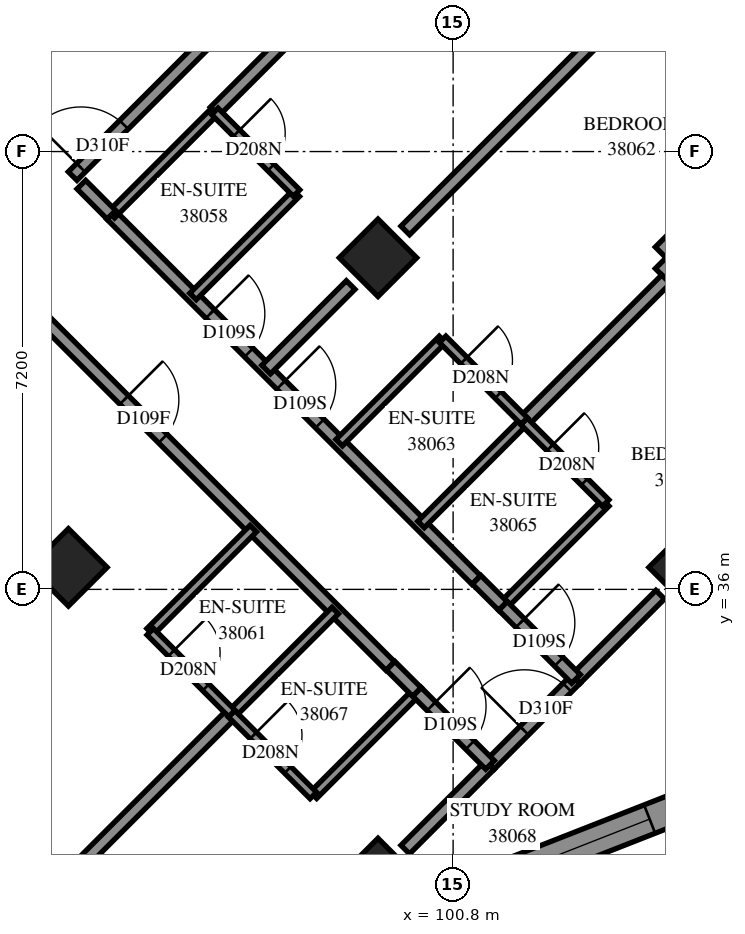
"""IFC4 building model, lengths in metres.
Left out: names, types, materials, properties, quantities, classifications, styles, units other than length and angle.
Written with IfcOpenShell. Run it as: python <this file> out.ifc"""

import sys

from ifc_helpers import new_model, si_unit, direction, frame, frame_2d, origin, origin_2d, place, context, subcontext, project, spatial, polyline, rectangle, outline, extrude, element, fill, save


model = new_model("IFC4")
c1 = context("Model", 3, precision=1e-05, world=origin(), true_north=direction((0.0, 1.0)))
c2 = subcontext(c1, "Body", "Model", "MODEL_VIEW")
j1 = project(units=[si_unit("LENGTHUNIT", "METRE"), si_unit("PLANEANGLEUNIT", "RADIAN")], contexts=[c1])
p1 = place(None, origin())
s1 = spatial("IfcSite", under=j1, at=p1, CompositionType="ELEMENT")
p2 = place(p1, origin())
s2 = spatial("IfcBuilding", under=s1, at=p2, CompositionType="ELEMENT")
p3 = place(p2, frame((0.0, 0.0, 142.2)))
s3 = spatial("IfcBuildingStorey", under=s2, at=p3, CompositionType="ELEMENT", Elevation=142.2)
for number, where, z_axis, x_axis in (
    (1, (99.565, 41.453, 0.0), (0.0, 0.0, 1.0), (0.707, -0.707, 0.0)),
    (2, (94.474, 36.362, 0.0), (0.0, 0.0, 1.0), (0.707, -0.707, 0.0)),
    (3, (104.656, 36.362, 0.0), (0.0, 0.0, 1.0), (0.707, -0.707, 0.0)),
    (4, (99.565, 31.271, 0.0), (0.0, 0.0, 1.0), (0.707, -0.707, 0.0)),
):
    element("IfcColumn", number, at=place(p3, frame(where, z_axis=z_axis, x_axis=x_axis)), inside=s3, PredefinedType="COLUMN", context=c2, shape_type="SweptSolid", body=[
        extrude(rectangle(XDim=0.9, YDim=0.9, at=origin_2d()), origin(), (0.0, 0.0, 1.0), 3.1),
    ])
p4 = place(p3, frame((87.049, 38.695, -0.3), z_axis=(0.0, 0.0, 1.0), x_axis=(0.7071067812, 0.7071067812, 0.0)))
e5 = element("IfcWall", 5, at=p4, inside=s3, PredefinedType="SHEAR", context=c2, shape_type="SweptSolid", body=[
    extrude(rectangle(XDim=14.4, YDim=0.6, at=frame_2d((7.2, 0.0))), origin(), (0.0, 0.0, 1.0), 2.7),
])
p5 = place(p4, frame((4.55, 0.0, 0.3)))
e6 = element("IfcOpeningElement", 6, at=p5, cuts=e5, PredefinedType="OPENING", context=c2, shape_type="SweptSolid", body=[
    extrude(rectangle(XDim=1.1, YDim=2.1, at=frame_2d((0.55, 1.05))), frame((0.0, 0.31, 0.0), z_axis=(0.0, -1.0, 0.0), x_axis=(1.0, 0.0, 0.0)), (0.0, 0.0, 1.0), 0.62),
])
p6 = place(p4, frame((11.35, 0.0, 0.3)))
e7 = element("IfcOpeningElement", 7, at=p6, cuts=e5, PredefinedType="OPENING", context=c2, shape_type="SweptSolid", body=[
    extrude(rectangle(XDim=1.1, YDim=2.1, at=frame_2d((0.55, 1.05))), frame((0.0, 0.31, 0.0), z_axis=(0.0, -1.0, 0.0), x_axis=(1.0, 0.0, 0.0)), (0.0, 0.0, 1.0), 0.62),
])
p7 = place(p3, frame((100.871, 30.982, 0.0), z_axis=(0.0, 0.0, 1.0), x_axis=(0.9309312258, 0.3651945412, 0.0)))
e8 = element("IfcWall", 8, at=p7, inside=s3, PredefinedType="SOLIDWALL", context=c2, shape_type="SweptSolid", body=[
    extrude(outline(polyline([(0.109, -0.25), (5.609, -0.25), (5.38, 0.25), (-0.109, 0.25), (0.109, -0.25)])), origin(), (0.0, 0.0, 1.0), 3.1),
])
p8 = place(p7, frame((0.596, 0.0, 0.45)))
e9 = element("IfcOpeningElement", 9, at=p8, cuts=e8, PredefinedType="OPENING", context=c2, shape_type="SweptSolid", body=[
    extrude(rectangle(XDim=2.8, YDim=2.5, at=frame_2d((1.4, 1.25))), frame((0.0, 0.26, 0.0), z_axis=(0.0, -1.0, 0.0), x_axis=(1.0, 0.0, 0.0)), (0.0, 0.0, 1.0), 0.52),
])
p9 = place(p3, frame((107.762, 37.994, 0.0), z_axis=(0.0, 0.0, 1.0), x_axis=(-0.7071170013, 0.7070965609, 0.0)))
e10 = element("IfcWall", 10, at=p9, inside=s3, PredefinedType="SOLIDWALL", context=c2, shape_type="SweptSolid", body=[
    extrude(outline(polyline([(-0.158, -0.25), (4.642, -0.25), (5.142, 0.25), (0.158, 0.25), (-0.158, -0.25)])), origin(), (0.0, 0.0, 1.0), 3.1),
])
p10 = place(p9, frame((1.967, 0.0, 0.6)))
e11 = element("IfcOpeningElement", 11, at=p10, cuts=e10, PredefinedType="OPENING", context=c2, shape_type="SweptSolid", body=[
    extrude(rectangle(XDim=1.8, YDim=1.9, at=frame_2d((0.9, 0.95))), frame((0.0, 0.26, 0.0), z_axis=(0.0, -1.0, 0.0), x_axis=(1.0, 0.0, 0.0)), (0.0, 0.0, 1.0), 0.52),
])
p11 = place(p3, frame((104.302, 41.453, 0.0), z_axis=(0.0, 0.0, 1.0), x_axis=(0.707115584, 0.7070979783, 0.0)))
e12 = element("IfcWall", 12, at=p11, inside=s3, PredefinedType="SOLIDWALL", context=c2, shape_type="SweptSolid", body=[
    extrude(outline(polyline([(0.25, -0.25), (6.011, -0.25), (5.349, 0.25), (-0.25, 0.25), (0.25, -0.25)])), origin(), (0.0, 0.0, 1.0), 3.1),
])
p12 = place(p11, frame((1.125, 0.0, 0.6)))
e13 = element("IfcOpeningElement", 13, at=p12, cuts=e12, PredefinedType="OPENING", context=c2, shape_type="SweptSolid", body=[
    extrude(rectangle(XDim=1.8, YDim=1.9, at=frame_2d((0.9, 0.95))), frame((0.0, 0.26, 0.0), z_axis=(0.0, -1.0, 0.0), x_axis=(1.0, 0.0, 0.0)), (0.0, 0.0, 1.0), 0.52),
])
p13 = place(p3, frame((93.127, 41.379, 0.0), z_axis=(0.0, 0.0, 1.0), x_axis=(0.7071067812, -0.7071067812, 0.0)))
e14 = element("IfcWall", 14, at=p13, inside=s3, PredefinedType="PARTITIONING", context=c2, shape_type="SweptSolid", body=[
    extrude(rectangle(XDim=9.39, YDim=0.2, at=frame_2d((4.695, 0.0))), origin(), (0.0, 0.0, 1.0), 3.1),
])
p14 = place(p13, frame((3.2, 0.0, 0.0)))
e15 = element("IfcOpeningElement", 15, at=p14, cuts=e14, PredefinedType="OPENING", context=c2, shape_type="SweptSolid", body=[
    extrude(rectangle(XDim=0.9, YDim=2.1, at=frame_2d((0.45, 1.05))), frame((0.0, 0.11, 0.0), z_axis=(0.0, -1.0, 0.0), x_axis=(1.0, 0.0, 0.0)), (0.0, 0.0, 1.0), 0.22),
])
p15 = place(p3, frame((94.543, 42.797, 0.0), z_axis=(0.0, 0.0, 1.0), x_axis=(0.7071067812, 0.7071067812, 0.0)))
e16 = element("IfcWall", 16, at=p15, inside=s3, PredefinedType="PARTITIONING", context=c2, shape_type="SweptSolid", body=[
    extrude(rectangle(XDim=8.901, YDim=0.2, at=frame_2d((4.45, 0.0))), origin(), (0.0, 0.0, 1.0), 3.1),
])
p16 = place(p15, frame((0.193, 0.0, 0.0)))
e17 = element("IfcOpeningElement", 17, at=p16, cuts=e16, PredefinedType="OPENING", context=c2, shape_type="SweptSolid", body=[
    extrude(rectangle(XDim=1.0, YDim=2.1, at=frame_2d((0.5, 1.05))), frame((0.0, 0.11, 0.0), z_axis=(0.0, -1.0, 0.0), x_axis=(1.0, 0.0, 0.0)), (0.0, 0.0, 1.0), 0.22),
])
p17 = place(p3, frame((95.177, 42.157, 0.0), z_axis=(0.0, 0.0, 1.0), x_axis=(0.7071067812, -0.7071067812, 0.0)))
e18 = element("IfcWall", 18, at=p17, inside=s3, PredefinedType="PARTITIONING", context=c2, shape_type="SweptSolid", body=[
    extrude(rectangle(XDim=8.491, YDim=0.2, at=frame_2d((4.245, 0.0))), origin(), (0.0, 0.0, 1.0), 3.1),
])
p18 = place(p17, frame((2.3, 0.0, 0.0)))
e19 = element("IfcOpeningElement", 19, at=p18, cuts=e18, PredefinedType="OPENING", context=c2, shape_type="SweptSolid", body=[
    extrude(rectangle(XDim=0.9, YDim=2.1, at=frame_2d((0.45, 1.05))), frame((0.0, 0.11, 0.0), z_axis=(0.0, -1.0, 0.0), x_axis=(1.0, 0.0, 0.0)), (0.0, 0.0, 1.0), 0.22),
])
p19 = place(p17, frame((3.95, 0.0, 0.0)))
e20 = element("IfcOpeningElement", 20, at=p19, cuts=e18, PredefinedType="OPENING", context=c2, shape_type="SweptSolid", body=[
    extrude(rectangle(XDim=0.9, YDim=2.1, at=frame_2d((0.45, 1.05))), frame((0.0, 0.11, 0.0), z_axis=(0.0, -1.0, 0.0), x_axis=(1.0, 0.0, 0.0)), (0.0, 0.0, 1.0), 0.22),
])
p20 = place(p3, frame((96.877, 43.859, 0.0), z_axis=(0.0, 0.0, 1.0), x_axis=(0.7071127272, 0.7071008351, 0.0)))
e21 = element("IfcWall", 21, at=p20, inside=s3, PredefinedType="PARTITIONING", context=c2, shape_type="SweptSolid", body=[
    extrude(rectangle(XDim=8.409, YDim=0.2, at=frame_2d((4.205, 0.0))), origin(), (0.0, 0.0, 1.0), 3.1),
])
p21 = place(p3, frame((91.387, 28.186, 0.0), z_axis=(0.0, 0.0, 1.0), x_axis=(0.7071067812, 0.7071067812, 0.0)))
e22 = element("IfcWall", 22, at=p21, inside=s3, PredefinedType="PARTITIONING", context=c2, shape_type="SweptSolid", body=[
    extrude(rectangle(XDim=8.164, YDim=0.2, at=frame_2d((4.082, 0.0))), origin(), (0.0, 0.0, 1.0), 3.1),
])
p22 = place(p3, frame((100.013, 41.903, 0.0), z_axis=(0.0, 0.0, 1.0), x_axis=(0.7071067812, 0.7071067812, 0.0)))
e23 = element("IfcWall", 23, at=p22, inside=s3, PredefinedType="PARTITIONING", context=c2, shape_type="SweptSolid", body=[
    extrude(rectangle(XDim=5.928, YDim=0.2, at=frame_2d((2.964, 0.0))), origin(), (0.0, 0.0, 1.0), 3.1),
])
p23 = place(p3, frame((101.968, 38.766, 0.0), z_axis=(0.0, 0.0, 1.0), x_axis=(0.7071067812, 0.7071067812, 0.0)))
e24 = element("IfcWall", 24, at=p23, inside=s3, PredefinedType="PARTITIONING", context=c2, shape_type="SweptSolid", body=[
    extrude(rectangle(XDim=3.3, YDim=0.2, at=frame_2d((1.65, 0.0))), origin(), (0.0, 0.0, 1.0), 3.1),
])
for number, where, z_axis, x_axis in (
    (25, (96.523, 40.817, 0.0), (0.0, 0.0, 1.0), (0.707, 0.707, 0.0)),
    (26, (98.927, 38.413, 0.0), (0.0, 0.0, 1.0), (0.707, 0.707, 0.0)),
    (27, (98.503, 32.615, 0.0), (0.0, 0.0, 1.0), (0.707, 0.707, 0.0)),
    (28, (95.179, 42.161, 0.0), (0.0, 0.0, 1.0), (0.707, 0.707, 0.0)),
):
    element("IfcWall", number, at=place(p3, frame(where, z_axis=z_axis, x_axis=x_axis)), inside=s3, PredefinedType="PARTITIONING", context=c2, shape_type="SweptSolid", body=[
        extrude(rectangle(XDim=2.401, YDim=0.15, at=frame_2d((1.201, 0.0))), origin(), (0.0, 0.0, 1.0), 3.1),
    ])
for number, where, z_axis, x_axis in (
    (29, (97.163, 33.955, 0.0), (0.0, 0.0, 1.0), (0.708, 0.707, 0.0)),
    (30, (100.273, 37.067, 0.0), (0.0, 0.0, 1.0), (0.707, 0.708, 0.0)),
):
    element("IfcWall", number, at=place(p3, frame(where, z_axis=z_axis, x_axis=x_axis)), inside=s3, PredefinedType="PARTITIONING", context=c2, shape_type="SweptSolid", body=[
        extrude(rectangle(XDim=2.4, YDim=0.15, at=frame_2d((1.2, 0.0))), origin(), (0.0, 0.0, 1.0), 3.1),
    ])
for number, where, z_axis, x_axis in (
    (31, (95.817, 35.303, 0.0), (0.0, 0.0, 1.0), (0.707, 0.707, 0.0)),
    (32, (101.615, 35.727, 0.0), (0.0, 0.0, 1.0), (0.707, 0.707, 0.0)),
):
    element("IfcWall", number, at=place(p3, frame(where, z_axis=z_axis, x_axis=x_axis)), inside=s3, PredefinedType="PARTITIONING", context=c2, shape_type="SweptSolid", body=[
        extrude(rectangle(XDim=2.398, YDim=0.15, at=frame_2d((1.199, 0.0))), origin(), (0.0, 0.0, 1.0), 3.1),
    ])
p24 = place(p3, frame((101.403, 33.111, 0.0), z_axis=(0.0, 0.0, 1.0), x_axis=(0.7071067812, 0.7071067812, 0.0)))
e33 = element("IfcWall", 33, at=p24, inside=s3, PredefinedType="PARTITIONING", context=c2, shape_type="SweptSolid", body=[
    extrude(rectangle(XDim=2.0, YDim=0.2, at=frame_2d((1.0, 0.0))), origin(), (0.0, 0.0, 1.0), 2.6),
])
p25 = place(p24, frame((0.802, 0.0, 0.0)))
e34 = element("IfcOpeningElement", 34, at=p25, cuts=e33, PredefinedType="OPENING", context=c2, shape_type="SweptSolid", body=[
    extrude(rectangle(XDim=1.0, YDim=2.1, at=frame_2d((0.5, 1.05))), frame((0.0, 0.11, 0.0), z_axis=(0.0, -1.0, 0.0), x_axis=(1.0, 0.0, 0.0)), (0.0, 0.0, 1.0), 0.22),
])
p26 = place(p3, frame((100.013, 31.721, 0.0), z_axis=(0.0, 0.0, 1.0), x_axis=(0.7071067812, 0.7071067812, 0.0)))
e35 = element("IfcWall", 35, at=p26, inside=s3, PredefinedType="PARTITIONING", context=c2, shape_type="SweptSolid", body=[
    extrude(rectangle(XDim=1.966, YDim=0.2, at=frame_2d((0.983, 0.0))), origin(), (0.0, 0.0, 1.0), 2.6),
])
p27 = place(p3, frame((97.725, 39.615, 0.0), z_axis=(0.0, 0.0, 1.0), x_axis=(0.7071067812, 0.7071067812, 0.0)))
e36 = element("IfcWall", 36, at=p27, inside=s3, PredefinedType="PARTITIONING", context=c2, shape_type="SweptSolid", body=[
    extrude(rectangle(XDim=1.966, YDim=0.2, at=frame_2d((0.983, 0.0))), origin(), (0.0, 0.0, 1.0), 3.1),
])
p28 = place(p3, frame((102.817, 34.525, 0.0), z_axis=(0.0, 0.0, 1.0), x_axis=(0.7071067812, 0.7071067812, 0.0)))
e37 = element("IfcWall", 37, at=p28, inside=s3, PredefinedType="PARTITIONING", context=c2, shape_type="SweptSolid", body=[
    extrude(rectangle(XDim=1.963, YDim=0.2, at=frame_2d((0.982, 0.0))), origin(), (0.0, 0.0, 1.0), 2.6),
])
p29 = place(p3, frame((97.157, 33.955, 0.0), z_axis=(0.0, 0.0, 1.0), x_axis=(0.7071067812, -0.7071067812, 0.0)))
e38 = element("IfcWall", 38, at=p29, inside=s3, PredefinedType="PARTITIONING", context=c2, shape_type="SweptSolid", body=[
    extrude(rectangle(XDim=1.901, YDim=0.15, at=frame_2d((0.95, 0.0))), origin(), (0.0, 0.0, 1.0), 3.1),
])
p30 = place(p29, frame((0.506, 0.0, 0.0)))
e39 = element("IfcOpeningElement", 39, at=p30, cuts=e38, PredefinedType="OPENING", context=c2, shape_type="SweptSolid", body=[
    extrude(rectangle(XDim=0.8, YDim=2.1, at=frame_2d((0.4, 1.05))), frame((0.0, 0.085, 0.0), z_axis=(0.0, -1.0, 0.0), x_axis=(1.0, 0.0, 0.0)), (0.0, 0.0, 1.0), 0.17),
])
p31 = place(p3, frame((96.881, 43.861, 0.0), z_axis=(0.0, 0.0, 1.0), x_axis=(0.7071067812, -0.7071067812, 0.0)))
e40 = element("IfcWall", 40, at=p31, inside=s3, PredefinedType="PARTITIONING", context=c2, shape_type="SweptSolid", body=[
    extrude(rectangle(XDim=1.901, YDim=0.15, at=frame_2d((0.95, 0.0))), origin(), (0.0, 0.0, 1.0), 3.1),
])
p32 = place(p31, frame((0.505, 0.0, 0.0)))
e41 = element("IfcOpeningElement", 41, at=p32, cuts=e40, PredefinedType="OPENING", context=c2, shape_type="SweptSolid", body=[
    extrude(rectangle(XDim=0.8, YDim=2.1, at=frame_2d((0.4, 1.05))), frame((0.0, 0.085, 0.0), z_axis=(0.0, -1.0, 0.0), x_axis=(1.0, 0.0, 0.0)), (0.0, 0.0, 1.0), 0.17),
])
p33 = place(p3, frame((101.965, 38.763, 0.0), z_axis=(0.0, 0.0, 1.0), x_axis=(0.7071067812, -0.7071067812, 0.0)))
e42 = element("IfcWall", 42, at=p33, inside=s3, PredefinedType="PARTITIONING", context=c2, shape_type="SweptSolid", body=[
    extrude(rectangle(XDim=1.901, YDim=0.15, at=frame_2d((0.95, 0.0))), origin(), (0.0, 0.0, 1.0), 3.1),
])
p34 = place(p33, frame((0.608, 0.0, 0.0)))
e43 = element("IfcOpeningElement", 43, at=p34, cuts=e42, PredefinedType="OPENING", context=c2, shape_type="SweptSolid", body=[
    extrude(rectangle(XDim=0.8, YDim=2.1, at=frame_2d((0.4, 1.05))), frame((0.0, 0.085, 0.0), z_axis=(0.0, -1.0, 0.0), x_axis=(1.0, 0.0, 0.0)), (0.0, 0.0, 1.0), 0.17),
])
p35 = place(p3, frame((100.628, 40.112, 0.0), z_axis=(0.0, 0.0, 1.0), x_axis=(0.7065800724, -0.7076330979, 0.0)))
e44 = element("IfcWall", 44, at=p35, inside=s3, PredefinedType="PARTITIONING", context=c2, shape_type="SweptSolid", body=[
    extrude(rectangle(XDim=1.899, YDim=0.15, at=frame_2d((0.95, 0.0))), origin(), (0.0, 0.0, 1.0), 3.1),
])
p36 = place(p35, frame((0.493, 0.0, 0.0)))
e45 = element("IfcOpeningElement", 45, at=p36, cuts=e44, PredefinedType="OPENING", context=c2, shape_type="SweptSolid", body=[
    extrude(rectangle(XDim=0.8, YDim=2.1, at=frame_2d((0.4, 1.05))), frame((0.0, 0.085, 0.0), z_axis=(0.0, -1.0, 0.0), x_axis=(1.0, 0.0, 0.0)), (0.0, 0.0, 1.0), 0.17),
])
p37 = place(p3, frame((95.82, 35.304, 0.0), z_axis=(0.0, 0.0, 1.0), x_axis=(0.7065800724, -0.7076330979, 0.0)))
e46 = element("IfcWall", 46, at=p37, inside=s3, PredefinedType="PARTITIONING", context=c2, shape_type="SweptSolid", body=[
    extrude(rectangle(XDim=1.899, YDim=0.15, at=frame_2d((0.95, 0.0))), origin(), (0.0, 0.0, 1.0), 3.1),
])
p38 = place(p37, frame((0.493, 0.0, 0.0)))
e47 = element("IfcOpeningElement", 47, at=p38, cuts=e46, PredefinedType="OPENING", context=c2, shape_type="SweptSolid", body=[
    extrude(rectangle(XDim=0.8, YDim=2.1, at=frame_2d((0.4, 1.05))), frame((0.0, 0.085, 0.0), z_axis=(0.0, -1.0, 0.0), x_axis=(1.0, 0.0, 0.0)), (0.0, 0.0, 1.0), 0.17),
])
p39 = place(p3, frame((100.205, 34.315, 0.0), z_axis=(0.0, 0.0, 1.0), x_axis=(0.7071067812, -0.7071067812, 0.0)))
e48 = element("IfcWall", 48, at=p39, inside=s3, PredefinedType="PARTITIONING", context=c2, shape_type="SweptSolid", body=[
    extrude(rectangle(XDim=1.7, YDim=0.2, at=frame_2d((0.85, 0.0))), origin(), (0.0, 0.0, 1.0), 3.1),
])
p40 = place(p39, frame((0.335, 0.0, 0.0)))
e49 = element("IfcOpeningElement", 49, at=p40, cuts=e48, PredefinedType="OPENING", context=c2, shape_type="SweptSolid", body=[
    extrude(rectangle(XDim=0.9, YDim=2.1, at=frame_2d((0.45, 1.05))), frame((0.0, 0.11, 0.0), z_axis=(0.0, -1.0, 0.0), x_axis=(1.0, 0.0, 0.0)), (0.0, 0.0, 1.0), 0.22),
])
p41 = place(p3, frame((101.619, 35.729, 0.0), z_axis=(0.0, 0.0, 1.0), x_axis=(0.7071067812, -0.7071067812, 0.0)))
e50 = element("IfcWall", 50, at=p41, inside=s3, PredefinedType="PARTITIONING", context=c2, shape_type="SweptSolid", body=[
    extrude(rectangle(XDim=1.7, YDim=0.2, at=frame_2d((0.85, 0.0))), origin(), (0.0, 0.0, 1.0), 3.1),
])
p42 = place(p41, frame((0.4, 0.0, 0.0)))
e51 = element("IfcOpeningElement", 51, at=p42, cuts=e50, PredefinedType="OPENING", context=c2, shape_type="SweptSolid", body=[
    extrude(rectangle(XDim=0.9, YDim=2.1, at=frame_2d((0.45, 1.05))), frame((0.0, 0.11, 0.0), z_axis=(0.0, -1.0, 0.0), x_axis=(1.0, 0.0, 0.0)), (0.0, 0.0, 1.0), 0.22),
])
p43 = place(p3, frame((94.686, 42.656, 0.0), z_axis=(0.0, 0.0, 1.0), x_axis=(0.7056768426, -0.7085338339, 0.0)))
e52 = element("IfcWall", 52, at=p43, inside=s3, PredefinedType="PARTITIONING", context=c2, shape_type="SweptSolid", body=[
    extrude(rectangle(XDim=0.7, YDim=0.2, at=frame_2d((0.35, 0.0))), origin(), (0.0, 0.0, 1.0), 3.1),
])
for number, where, z_axis, x_axis in (
    (53, (101.186, 36.158, 0.0), (0.0, 0.0, 1.0), (0.709, -0.705, 0.0)),
    (54, (99.772, 34.744, 0.0), (0.0, 0.0, 1.0), (0.709, -0.705, 0.0)),
):
    element("IfcWall", number, at=place(p3, frame(where, z_axis=z_axis, x_axis=x_axis)), inside=s3, PredefinedType="PARTITIONING", context=c2, shape_type="SweptSolid", body=[
        extrude(rectangle(XDim=0.61, YDim=0.2, at=frame_2d((0.305, 0.0))), origin(), (0.0, 0.0, 1.0), 3.1),
    ])
p44 = place(p8, origin())
e55 = element("IfcWindow", 55, at=p44, inside=s3, PartitioningType="SINGLE_PANEL", PredefinedType="WINDOW", context=c2, shape_type="SweptSolid", body=[
    extrude(rectangle(XDim=2.8, YDim=2.5, at=frame_2d((1.4, 1.25))), frame((0.0, 0.18, 0.0), z_axis=(0.0, -1.0, 0.0), x_axis=(1.0, 0.0, 0.0)), (0.0, 0.0, 1.0), 0.06),
])
fill(e9, e55)
p45 = place(p16, origin())
e56 = element("IfcDoor", 56, at=p45, inside=s3, OperationType="SINGLE_SWING_LEFT", PredefinedType="DOOR", context=c2, shape_type="SweptSolid", body=[
    extrude(rectangle(XDim=1.0, YDim=2.1, at=frame_2d((0.5, 1.05))), frame((0.0, 0.025, 0.0), z_axis=(0.0, -1.0, 0.0), x_axis=(1.0, 0.0, 0.0)), (0.0, 0.0, 1.0), 0.05),
])
fill(e17, e56)
p46 = place(p18, origin())
e57 = element("IfcDoor", 57, at=p46, inside=s3, OperationType="SINGLE_SWING_RIGHT", PredefinedType="DOOR", context=c2, shape_type="SweptSolid", body=[
    extrude(rectangle(XDim=0.9, YDim=2.1, at=frame_2d((0.45, 1.05))), frame((0.0, 0.025, 0.0), z_axis=(0.0, -1.0, 0.0), x_axis=(1.0, 0.0, 0.0)), (0.0, 0.0, 1.0), 0.05),
])
fill(e19, e57)
p47 = place(p32, origin())
e58 = element("IfcDoor", 58, at=p47, inside=s3, OperationType="SINGLE_SWING_RIGHT", PredefinedType="DOOR", context=c2, shape_type="SweptSolid", body=[
    extrude(rectangle(XDim=0.8, YDim=2.1, at=frame_2d((0.4, 1.05))), frame((0.0, 0.025, 0.0), z_axis=(0.0, -1.0, 0.0), x_axis=(1.0, 0.0, 0.0)), (0.0, 0.0, 1.0), 0.05),
])
fill(e41, e58)
p48 = place(p14, origin())
e59 = element("IfcDoor", 59, at=p48, inside=s3, OperationType="SINGLE_SWING_LEFT", PredefinedType="DOOR", context=c2, shape_type="SweptSolid", body=[
    extrude(rectangle(XDim=0.9, YDim=2.1, at=frame_2d((0.45, 1.05))), frame((0.0, 0.025, 0.0), z_axis=(0.0, -1.0, 0.0), x_axis=(1.0, 0.0, 0.0)), (0.0, 0.0, 1.0), 0.05),
])
fill(e15, e59)
p49 = place(p38, origin())
e60 = element("IfcDoor", 60, at=p49, inside=s3, OperationType="SINGLE_SWING_RIGHT", PredefinedType="DOOR", context=c2, shape_type="SweptSolid", body=[
    extrude(rectangle(XDim=0.8, YDim=2.1, at=frame_2d((0.4, 1.05))), frame((0.0, 0.025, 0.0), z_axis=(0.0, -1.0, 0.0), x_axis=(1.0, 0.0, 0.0)), (0.0, 0.0, 1.0), 0.05),
])
fill(e47, e60)
p50 = place(p19, origin())
e61 = element("IfcDoor", 61, at=p50, inside=s3, OperationType="SINGLE_SWING_LEFT", PredefinedType="DOOR", context=c2, shape_type="SweptSolid", body=[
    extrude(rectangle(XDim=0.9, YDim=2.1, at=frame_2d((0.45, 1.05))), frame((0.0, 0.025, 0.0), z_axis=(0.0, -1.0, 0.0), x_axis=(1.0, 0.0, 0.0)), (0.0, 0.0, 1.0), 0.05),
])
fill(e20, e61)
p51 = place(p36, origin())
e62 = element("IfcDoor", 62, at=p51, inside=s3, OperationType="SINGLE_SWING_RIGHT", PredefinedType="DOOR", context=c2, shape_type="SweptSolid", body=[
    extrude(rectangle(XDim=0.8, YDim=2.1, at=frame_2d((0.4, 1.05))), frame((0.0, 0.025, 0.0), z_axis=(0.0, -1.0, 0.0), x_axis=(1.0, 0.0, 0.0)), (0.0, 0.0, 1.0), 0.05),
])
fill(e45, e62)
p52 = place(p42, origin())
e63 = element("IfcDoor", 63, at=p52, inside=s3, OperationType="SINGLE_SWING_RIGHT", PredefinedType="DOOR", context=c2, shape_type="SweptSolid", body=[
    extrude(rectangle(XDim=0.9, YDim=2.1, at=frame_2d((0.45, 1.05))), frame((0.0, 0.025, 0.0), z_axis=(0.0, -1.0, 0.0), x_axis=(1.0, 0.0, 0.0)), (0.0, 0.0, 1.0), 0.05),
])
fill(e51, e63)
p53 = place(p34, origin())
e64 = element("IfcDoor", 64, at=p53, inside=s3, OperationType="SINGLE_SWING_RIGHT", PredefinedType="DOOR", context=c2, shape_type="SweptSolid", body=[
    extrude(rectangle(XDim=0.8, YDim=2.1, at=frame_2d((0.4, 1.05))), frame((0.0, 0.025, 0.0), z_axis=(0.0, -1.0, 0.0), x_axis=(1.0, 0.0, 0.0)), (0.0, 0.0, 1.0), 0.05),
])
fill(e43, e64)
p54 = place(p40, origin())
e65 = element("IfcDoor", 65, at=p54, inside=s3, OperationType="SINGLE_SWING_LEFT", PredefinedType="DOOR", context=c2, shape_type="SweptSolid", body=[
    extrude(rectangle(XDim=0.9, YDim=2.1, at=frame_2d((0.45, 1.05))), frame((0.0, 0.025, 0.0), z_axis=(0.0, -1.0, 0.0), x_axis=(1.0, 0.0, 0.0)), (0.0, 0.0, 1.0), 0.05),
])
fill(e49, e65)
p55 = place(p30, origin())
e66 = element("IfcDoor", 66, at=p55, inside=s3, OperationType="SINGLE_SWING_RIGHT", PredefinedType="DOOR", context=c2, shape_type="SweptSolid", body=[
    extrude(rectangle(XDim=0.8, YDim=2.1, at=frame_2d((0.4, 1.05))), frame((0.0, 0.025, 0.0), z_axis=(0.0, -1.0, 0.0), x_axis=(1.0, 0.0, 0.0)), (0.0, 0.0, 1.0), 0.05),
])
fill(e39, e66)
p56 = place(p25, origin())
e67 = element("IfcDoor", 67, at=p56, inside=s3, OperationType="SINGLE_SWING_RIGHT", PredefinedType="DOOR", context=c2, shape_type="SweptSolid", body=[
    extrude(rectangle(XDim=1.0, YDim=2.1, at=frame_2d((0.5, 1.05))), frame((0.0, 0.025, 0.0), z_axis=(0.0, -1.0, 0.0), x_axis=(1.0, 0.0, 0.0)), (0.0, 0.0, 1.0), 0.05),
])
fill(e34, e67)
save(model, sys.argv[1])
